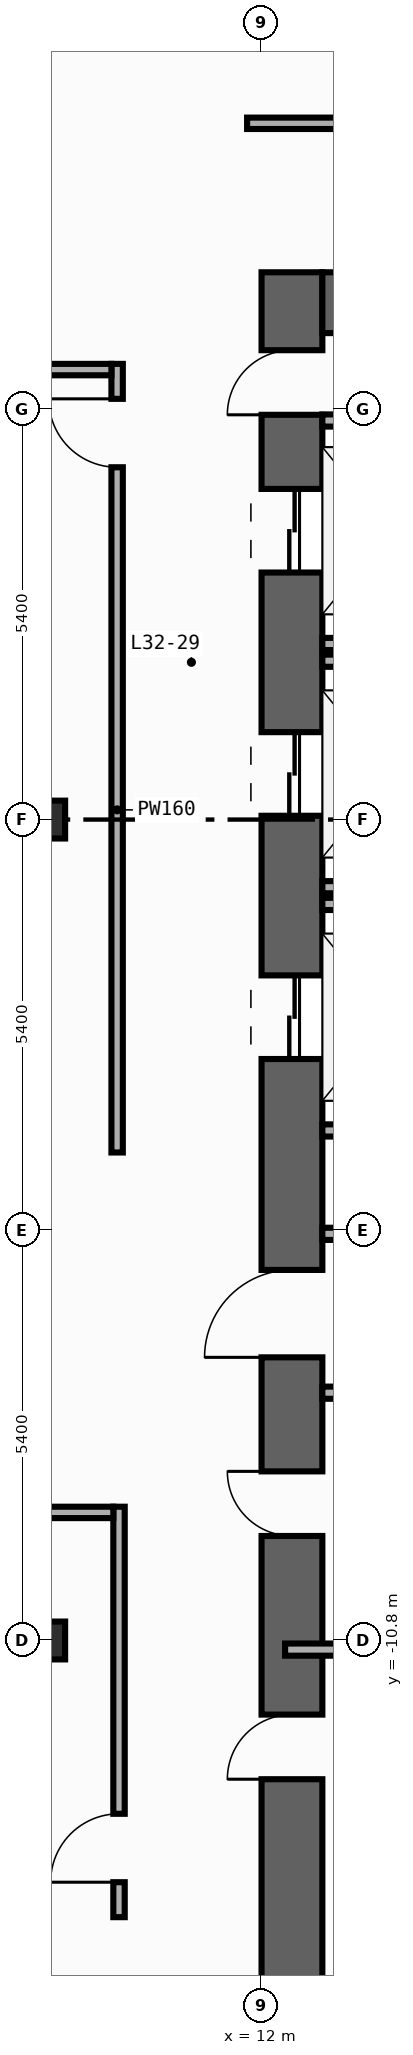
"""IFC4 building model, lengths in metres.
Left out: names, types, materials, properties, quantities, classifications, styles, units other than length and angle.
Written with IfcOpenShell. Run it as: python <this file> out.ifc"""

import sys

from ifc_helpers import new_model, si_unit, direction, frame, frame_2d, origin, origin_2d, place, context, subcontext, project, spatial, rectangle, i_section, extrude, element, fill, save


model = new_model("IFC4")
c1 = context("Model", 3, precision=1e-05, world=origin(), true_north=direction((0.0, 1.0)))
c2 = subcontext(c1, "Body", "Model", "MODEL_VIEW")
j1 = project(units=[si_unit("LENGTHUNIT", "METRE"), si_unit("PLANEANGLEUNIT", "RADIAN")], contexts=[c1])
p1 = place(None, origin())
s1 = spatial("IfcSite", under=j1, at=p1, CompositionType="ELEMENT")
p2 = place(p1, origin())
s2 = spatial("IfcBuilding", under=s1, at=p2, CompositionType="ELEMENT")
p3 = place(p2, frame((0.0, 0.0, 139.4)))
s3 = spatial("IfcBuildingStorey", under=s2, at=p3, CompositionType="ELEMENT", Elevation=139.4)
p4 = place(p3, frame((12.4, -19.8, 0.0), z_axis=(0.0, 0.0, 1.0), x_axis=(0.0, 1.0, 0.0)))
e1 = element("IfcWall", 1, at=p4, inside=s3, PredefinedType="SHEAR", context=c2, shape_type="SweptSolid", body=[
    extrude(rectangle(XDim=27.0, YDim=0.8, at=frame_2d((13.5, 0.0))), origin(), (0.0, 0.0, 1.0), 3.94),
])
p5 = place(p4, frame((23.05, 0.0, 0.0)))
e2 = element("IfcOpeningElement", 2, at=p5, cuts=e1, PredefinedType="OPENING", context=c2, shape_type="SweptSolid", body=[
    extrude(rectangle(XDim=1.1, YDim=2.2, at=frame_2d((0.55, 1.1))), frame((0.0, 0.41, 0.0), z_axis=(0.0, -1.0, 0.0), x_axis=(1.0, 0.0, 0.0)), (0.0, 0.0, 1.0), 0.82),
])
p6 = place(p4, frame((19.85, 0.0, 0.0)))
e3 = element("IfcOpeningElement", 3, at=p6, cuts=e1, PredefinedType="OPENING", context=c2, shape_type="SweptSolid", body=[
    extrude(rectangle(XDim=1.1, YDim=2.2, at=frame_2d((0.55, 1.1))), frame((0.0, 0.41, 0.0), z_axis=(0.0, -1.0, 0.0), x_axis=(1.0, 0.0, 0.0)), (0.0, 0.0, 1.0), 0.82),
])
p7 = place(p4, frame((16.65, 0.0, 0.0)))
e4 = element("IfcOpeningElement", 4, at=p7, cuts=e1, PredefinedType="OPENING", context=c2, shape_type="SweptSolid", body=[
    extrude(rectangle(XDim=1.1, YDim=2.2, at=frame_2d((0.55, 1.1))), frame((0.0, 0.41, 0.0), z_axis=(0.0, -1.0, 0.0), x_axis=(1.0, 0.0, 0.0)), (0.0, 0.0, 1.0), 0.82),
])
p8 = place(p4, frame((7.175, 0.0, 0.0)))
e5 = element("IfcOpeningElement", 5, at=p8, cuts=e1, PredefinedType="OPENING", context=c2, shape_type="SweptSolid", body=[
    extrude(rectangle(XDim=0.85, YDim=2.1, at=frame_2d((0.425, 1.05))), frame((0.0, 0.41, 0.0), z_axis=(0.0, -1.0, 0.0), x_axis=(1.0, 0.0, 0.0)), (0.0, 0.0, 1.0), 0.82),
])
p9 = place(p4, frame((10.375, 0.0, 0.0)))
e6 = element("IfcOpeningElement", 6, at=p9, cuts=e1, PredefinedType="OPENING", context=c2, shape_type="SweptSolid", body=[
    extrude(rectangle(XDim=0.85, YDim=2.1, at=frame_2d((0.425, 1.05))), frame((0.0, 0.41, 0.0), z_axis=(0.0, -1.0, 0.0), x_axis=(1.0, 0.0, 0.0)), (0.0, 0.0, 1.0), 0.82),
])
p10 = place(p4, frame((12.725, 0.0, 0.0)))
e7 = element("IfcOpeningElement", 7, at=p10, cuts=e1, PredefinedType="OPENING", context=c2, shape_type="SweptSolid", body=[
    extrude(rectangle(XDim=1.15, YDim=2.2, at=frame_2d((0.575, 1.1))), frame((0.0, 0.41, 0.0), z_axis=(0.0, -1.0, 0.0), x_axis=(1.0, 0.0, 0.0)), (0.0, 0.0, 1.0), 0.82),
])
p11 = place(p4, frame((25.125, 0.0, 0.0)))
e8 = element("IfcOpeningElement", 8, at=p11, cuts=e1, PredefinedType="OPENING", context=c2, shape_type="SweptSolid", body=[
    extrude(rectangle(XDim=0.85, YDim=2.1, at=frame_2d((0.425, 1.05))), frame((0.0, 0.41, 0.0), z_axis=(0.0, -1.0, 0.0), x_axis=(1.0, 0.0, 0.0)), (0.0, 0.0, 1.0), 0.82),
])
p12 = place(p3, frame((12.8, 6.8, 0.0), z_axis=(0.0, 0.0, 1.0), x_axis=(1.0, 0.0, 0.0)))
e9 = element("IfcWall", 9, at=p12, inside=s3, PredefinedType="SHEAR", context=c2, shape_type="SweptSolid", body=[
    extrude(rectangle(XDim=6.8, YDim=0.8, at=frame_2d((3.4, 0.0))), origin(), (0.0, 0.0, 1.0), 3.94),
])
for number, where, z_axis, x_axis in (
    (10, (9.2, -10.8, 0.0), (0.0, 0.0, 1.0), (1.0, 0.0, 0.0)),
    (11, (9.2, 0.0, 0.0), (0.0, 0.0, 1.0), (1.0, 0.0, 0.0)),
):
    element("IfcColumn", number, at=place(p3, frame(where, z_axis=z_axis, x_axis=x_axis)), inside=s3, PredefinedType="COLUMN", context=c2, shape_type="SweptSolid", body=[
        extrude(i_section(OverallWidth=0.432, OverallDepth=0.498, WebThickness=0.045, FlangeThickness=0.07, FilletRadius=0.022, at=origin_2d()), origin(), (0.0, 0.0, 1.0), 4.2),
    ])
for number, where, z_axis, x_axis in (
    (12, (12.8, 2.31, 0.0), (0.0, 0.0, 1.0), (1.0, 0.0, 0.0)),
    (13, (12.8, -0.89, 0.0), (0.0, 0.0, 1.0), (1.0, 0.0, 0.0)),
    (14, (12.8, 2.09, 0.0), (0.0, 0.0, 1.0), (1.0, 0.0, 0.0)),
    (15, (12.8, -4.09, 0.0), (0.0, 0.0, 1.0), (1.0, 0.0, 0.0)),
    (16, (12.8, -1.11, 0.0), (0.0, 0.0, 1.0), (1.0, 0.0, 0.0)),
):
    element("IfcWall", number, at=place(p3, frame(where, z_axis=z_axis, x_axis=x_axis)), inside=s3, PredefinedType="STANDARD", context=c2, shape_type="SweptSolid", body=[
        extrude(rectangle(XDim=2.19, YDim=0.16, at=frame_2d((1.095, 0.0))), origin(), (0.0, 0.0, 1.0), 3.94),
    ])
for number, where, z_axis, x_axis in (
    (17, (12.8, -5.45, 0.0), (0.0, 0.0, 1.0), (1.0, 0.0, 0.0)),
    (18, (12.8, -7.54, 0.0), (0.0, 0.0, 1.0), (1.0, 0.0, 0.0)),
    (19, (12.8, 5.25, 0.0), (0.0, 0.0, 1.0), (1.0, 0.0, 0.0)),
):
    element("IfcWall", number, at=place(p3, frame(where, z_axis=z_axis, x_axis=x_axis)), inside=s3, PredefinedType="STANDARD", context=c2, shape_type="SweptSolid", body=[
        extrude(rectangle(XDim=2.6, YDim=0.16, at=frame_2d((1.3, 0.0))), origin(), (0.0, 0.0, 1.0), 3.94),
    ])
p13 = place(p3, frame((12.31, -10.92, 0.0), z_axis=(0.0, 0.0, 1.0), x_axis=(1.0, 0.0, 0.0)))
e20 = element("IfcWall", 20, at=p13, inside=s3, PredefinedType="PARTITIONING", context=c2, shape_type="SweptSolid", body=[
    extrude(rectangle(XDim=3.065, YDim=0.16, at=frame_2d((1.532, 0.0))), origin(), (0.0, 0.0, 1.0), 3.24),
])
p14 = place(p3, frame((10.1, -4.38, 0.0), z_axis=(0.0, 0.0, 1.0), x_axis=(0.0, 1.0, 0.0)))
e21 = element("IfcWall", 21, at=p14, inside=s3, PredefinedType="PARTITIONING", context=c2, shape_type="SweptSolid", body=[
    extrude(rectangle(XDim=10.375, YDim=0.15, at=frame_2d((5.188, 0.0))), origin(), (0.0, 0.0, 1.0), 3.94),
])
p15 = place(p14, frame((9.015, 0.0, 0.0)))
e22 = element("IfcOpeningElement", 22, at=p15, cuts=e21, PredefinedType="OPENING", context=c2, shape_type="SweptSolid", body=[
    extrude(rectangle(XDim=0.9, YDim=2.15, at=frame_2d((0.45, 1.075))), frame((0.0, 0.085, 0.0), z_axis=(0.0, -1.0, 0.0), x_axis=(1.0, 0.0, 0.0)), (0.0, 0.0, 1.0), 0.17),
])
p16 = place(p3, frame((10.125, -14.44, 0.0), z_axis=(0.0, 0.0, 1.0), x_axis=(0.0, 1.0, 0.0)))
e23 = element("IfcWall", 23, at=p16, inside=s3, PredefinedType="PARTITIONING", context=c2, shape_type="SweptSolid", body=[
    extrude(rectangle(XDim=5.4, YDim=0.15, at=frame_2d((2.7, 0.0))), origin(), (0.0, 0.0, 1.0), 3.94),
])
p17 = place(p16, frame((0.46, 0.0, 0.0)))
e24 = element("IfcOpeningElement", 24, at=p17, cuts=e23, PredefinedType="OPENING", context=c2, shape_type="SweptSolid", body=[
    extrude(rectangle(XDim=0.9, YDim=2.15, at=frame_2d((0.45, 1.075))), frame((0.0, 0.085, 0.0), z_axis=(0.0, -1.0, 0.0), x_axis=(1.0, 0.0, 0.0)), (0.0, 0.0, 1.0), 0.17),
])
p18 = place(p3, frame((0.78, 5.92, 0.0), z_axis=(0.0, 0.0, 1.0), x_axis=(1.0, 0.0, 0.0)))
e25 = element("IfcWall", 25, at=p18, inside=s3, PredefinedType="PARTITIONING", context=c2, shape_type="SweptSolid", body=[
    extrude(rectangle(XDim=9.245, YDim=0.15, at=frame_2d((4.623, 0.0))), origin(), (0.0, 0.0, 1.0), 3.94),
])
p19 = place(p18, frame((0.46, 0.0, 0.0)))
e26 = element("IfcOpeningElement", 26, at=p19, cuts=e25, PredefinedType="OPENING", context=c2, shape_type="SweptSolid", body=[
    extrude(rectangle(XDim=0.9, YDim=2.15, at=frame_2d((0.45, 1.075))), frame((0.0, 0.085, 0.0), z_axis=(0.0, -1.0, 0.0), x_axis=(1.0, 0.0, 0.0)), (0.0, 0.0, 1.0), 0.17),
])
p20 = place(p3, frame((-0.015, -9.115, 0.0), z_axis=(0.0, 0.0, 1.0), x_axis=(1.0, 0.0, 0.0)))
e27 = element("IfcWall", 27, at=p20, inside=s3, PredefinedType="PARTITIONING", context=c2, shape_type="SweptSolid", body=[
    extrude(rectangle(XDim=10.065, YDim=0.15, at=frame_2d((5.032, 0.0))), origin(), (0.0, 0.0, 1.0), 3.94),
])
p21 = place(p20, frame((0.46, 0.0, 0.0)))
e28 = element("IfcOpeningElement", 28, at=p21, cuts=e27, PredefinedType="OPENING", context=c2, shape_type="SweptSolid", body=[
    extrude(rectangle(XDim=0.9, YDim=2.15, at=frame_2d((0.45, 1.075))), frame((0.0, 0.085, 0.0), z_axis=(0.0, -1.0, 0.0), x_axis=(1.0, 0.0, 0.0)), (0.0, 0.0, 1.0), 0.17),
])
p22 = place(p3, frame((11.81, 9.16, 0.0), z_axis=(0.0, 0.0, 1.0), x_axis=(1.0, 0.0, 0.0)))
e29 = element("IfcWall", 29, at=p22, inside=s3, PredefinedType="PARTITIONING", context=c2, shape_type="SweptSolid", body=[
    extrude(rectangle(XDim=8.83, YDim=0.15, at=frame_2d((4.415, 0.0))), origin(), (0.0, 0.0, 1.0), 3.94),
])
p23 = place(p22, frame((5.067, 0.0, 0.0)))
e30 = element("IfcOpeningElement", 30, at=p23, cuts=e29, PredefinedType="OPENING", context=c2, shape_type="SweptSolid", body=[
    extrude(rectangle(XDim=0.9, YDim=2.15, at=frame_2d((0.45, 1.075))), frame((0.0, 0.085, 0.0), z_axis=(0.0, -1.0, 0.0), x_axis=(1.0, 0.0, 0.0)), (0.0, 0.0, 1.0), 0.17),
])
p24 = place(p5, origin())
e31 = element("IfcDoor", 31, at=p24, inside=s3, OperationType="DOUBLE_DOOR_SLIDING", PredefinedType="DOOR", context=c2, shape_type="SweptSolid", body=[
    extrude(rectangle(XDim=1.1, YDim=2.2, at=frame_2d((0.55, 1.1))), frame((0.0, 0.025, 0.0), z_axis=(0.0, -1.0, 0.0), x_axis=(1.0, 0.0, 0.0)), (0.0, 0.0, 1.0), 0.05),
])
fill(e2, e31)
p25 = place(p6, origin())
e32 = element("IfcDoor", 32, at=p25, inside=s3, OperationType="DOUBLE_DOOR_SLIDING", PredefinedType="DOOR", context=c2, shape_type="SweptSolid", body=[
    extrude(rectangle(XDim=1.1, YDim=2.2, at=frame_2d((0.55, 1.1))), frame((0.0, 0.025, 0.0), z_axis=(0.0, -1.0, 0.0), x_axis=(1.0, 0.0, 0.0)), (0.0, 0.0, 1.0), 0.05),
])
fill(e3, e32)
p26 = place(p7, origin())
e33 = element("IfcDoor", 33, at=p26, inside=s3, OperationType="DOUBLE_DOOR_SLIDING", PredefinedType="DOOR", context=c2, shape_type="SweptSolid", body=[
    extrude(rectangle(XDim=1.1, YDim=2.2, at=frame_2d((0.55, 1.1))), frame((0.0, 0.025, 0.0), z_axis=(0.0, -1.0, 0.0), x_axis=(1.0, 0.0, 0.0)), (0.0, 0.0, 1.0), 0.05),
])
fill(e4, e33)
p27 = place(p8, origin())
e34 = element("IfcDoor", 34, at=p27, inside=s3, OperationType="SINGLE_SWING_LEFT", PredefinedType="DOOR", context=c2, shape_type="SweptSolid", body=[
    extrude(rectangle(XDim=0.85, YDim=2.1, at=frame_2d((0.425, 1.05))), frame((0.0, 0.025, 0.0), z_axis=(0.0, -1.0, 0.0), x_axis=(1.0, 0.0, 0.0)), (0.0, 0.0, 1.0), 0.05),
])
fill(e5, e34)
p28 = place(p9, origin())
e35 = element("IfcDoor", 35, at=p28, inside=s3, OperationType="SINGLE_SWING_RIGHT", PredefinedType="DOOR", context=c2, shape_type="SweptSolid", body=[
    extrude(rectangle(XDim=0.85, YDim=2.1, at=frame_2d((0.425, 1.05))), frame((0.0, 0.025, 0.0), z_axis=(0.0, -1.0, 0.0), x_axis=(1.0, 0.0, 0.0)), (0.0, 0.0, 1.0), 0.05),
])
fill(e6, e35)
p29 = place(p10, origin())
e36 = element("IfcDoor", 36, at=p29, inside=s3, OperationType="SINGLE_SWING_LEFT", PredefinedType="DOOR", context=c2, shape_type="SweptSolid", body=[
    extrude(rectangle(XDim=1.15, YDim=2.2, at=frame_2d((0.575, 1.1))), frame((0.0, 0.025, 0.0), z_axis=(0.0, -1.0, 0.0), x_axis=(1.0, 0.0, 0.0)), (0.0, 0.0, 1.0), 0.05),
])
fill(e7, e36)
p30 = place(p11, origin())
e37 = element("IfcDoor", 37, at=p30, inside=s3, OperationType="SINGLE_SWING_LEFT", PredefinedType="DOOR", context=c2, shape_type="SweptSolid", body=[
    extrude(rectangle(XDim=0.85, YDim=2.1, at=frame_2d((0.425, 1.05))), frame((0.0, 0.025, 0.0), z_axis=(0.0, -1.0, 0.0), x_axis=(1.0, 0.0, 0.0)), (0.0, 0.0, 1.0), 0.05),
])
fill(e8, e37)
p31 = place(p15, origin())
e38 = element("IfcDoor", 38, at=p31, inside=s3, OperationType="SINGLE_SWING_RIGHT", PredefinedType="DOOR", context=c2, shape_type="SweptSolid", body=[
    extrude(rectangle(XDim=0.9, YDim=2.15, at=frame_2d((0.45, 1.075))), frame((0.0, 0.025, 0.0), z_axis=(0.0, -1.0, 0.0), x_axis=(1.0, 0.0, 0.0)), (0.0, 0.0, 1.0), 0.05),
])
fill(e22, e38)
p32 = place(p17, origin())
e39 = element("IfcDoor", 39, at=p32, inside=s3, OperationType="SINGLE_SWING_LEFT", PredefinedType="DOOR", context=c2, shape_type="SweptSolid", body=[
    extrude(rectangle(XDim=0.9, YDim=2.15, at=frame_2d((0.45, 1.075))), frame((0.0, 0.025, 0.0), z_axis=(0.0, -1.0, 0.0), x_axis=(1.0, 0.0, 0.0)), (0.0, 0.0, 1.0), 0.05),
])
fill(e24, e39)
save(model, sys.argv[1])
